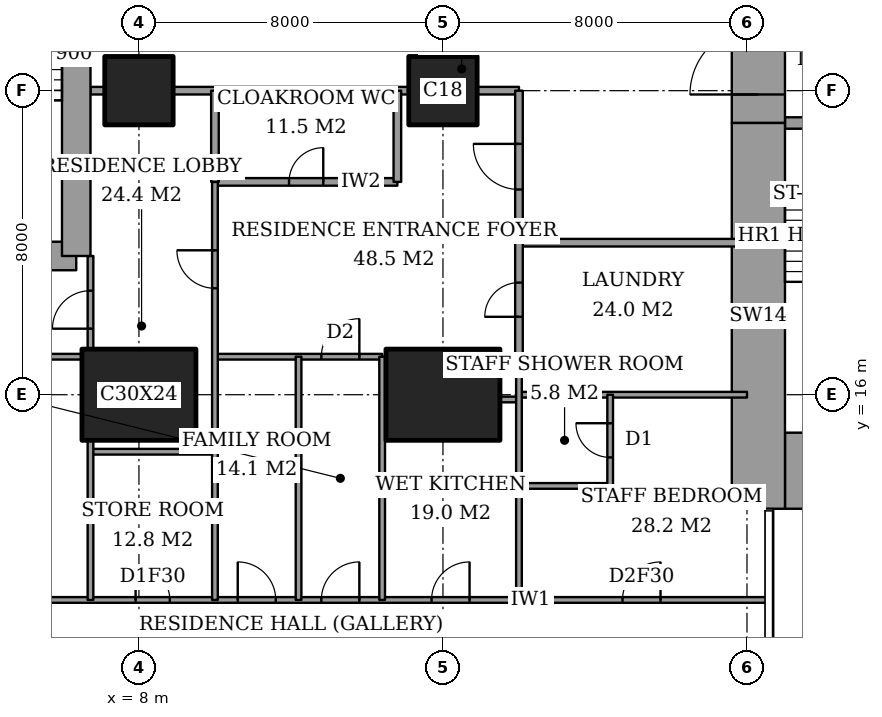
"""IFC4 building model, lengths in metres.
Left out: names, types, materials, properties, quantities, classifications, styles, units other than length and angle.
Written with IfcOpenShell. Run it as: python <this file> out.ifc"""

import sys

from ifc_helpers import new_model, si_unit, direction, frame, frame_2d, origin, origin_2d, place, context, subcontext, project, spatial, rectangle, extrude, element, fill, save


model = new_model("IFC4")
c1 = context("Model", 3, precision=1e-05, world=origin(), true_north=direction((0.0, 1.0)))
c2 = subcontext(c1, "Body", "Model", "MODEL_VIEW")
j1 = project(units=[si_unit("LENGTHUNIT", "METRE"), si_unit("PLANEANGLEUNIT", "RADIAN")], contexts=[c1])
p1 = place(None, origin())
s1 = spatial("IfcSite", under=j1, at=p1, CompositionType="ELEMENT")
p2 = place(p1, origin())
s2 = spatial("IfcBuilding", under=s1, at=p2, CompositionType="ELEMENT")
p3 = place(p2, frame((0.0, 0.0, 203.8)))
s3 = spatial("IfcBuildingStorey", under=s2, at=p3, CompositionType="ELEMENT", Elevation=203.8)
p4 = place(p3, frame((8.0, 16.0, 0.0), z_axis=(0.0, 0.0, 1.0), x_axis=(1.0, 0.0, 0.0)))
e1 = element("IfcColumn", 1, at=p4, inside=s3, PredefinedType="COLUMN", context=c2, shape_type="SweptSolid", body=[
    extrude(rectangle(XDim=3.0, YDim=2.4, at=origin_2d()), origin(), (0.0, 0.0, 1.0), 3.6),
])
p5 = place(p3, frame((8.0, 24.0, 0.0), z_axis=(0.0, 0.0, 1.0), x_axis=(1.0, 0.0, 0.0)))
e2 = element("IfcColumn", 2, at=p5, inside=s3, PredefinedType="COLUMN", context=c2, shape_type="SweptSolid", body=[
    extrude(rectangle(XDim=1.8, YDim=1.8, at=origin_2d()), origin(), (0.0, 0.0, 1.0), 3.6),
])
p6 = place(p3, frame((16.0, 16.0, 0.0), z_axis=(0.0, 0.0, 1.0), x_axis=(1.0, 0.0, 0.0)))
e3 = element("IfcColumn", 3, at=p6, inside=s3, PredefinedType="COLUMN", context=c2, shape_type="SweptSolid", body=[
    extrude(rectangle(XDim=3.0, YDim=2.4, at=origin_2d()), origin(), (0.0, 0.0, 1.0), 3.6),
])
p7 = place(p3, frame((16.0, 24.0, 0.0), z_axis=(0.0, 0.0, 1.0), x_axis=(1.0, 0.0, 0.0)))
e4 = element("IfcColumn", 4, at=p7, inside=s3, PredefinedType="COLUMN", context=c2, shape_type="SweptSolid", body=[
    extrude(rectangle(XDim=1.8, YDim=1.8, at=origin_2d()), origin(), (0.0, 0.0, 1.0), 3.6),
])
p8 = place(p3, frame((25.0, 14.0, 0.0), z_axis=(0.0, 0.0, 1.0), x_axis=(1.0, 0.0, 0.0)))
e5 = element("IfcWall", 5, at=p8, inside=s3, PredefinedType="SHEAR", context=c2, shape_type="SweptSolid", body=[
    extrude(rectangle(XDim=3.15, YDim=2.0, at=frame_2d((1.575, 0.0))), origin(), (0.0, 0.0, 1.0), 3.6),
])
p9 = place(p3, frame((24.3, 13.0, 0.0), z_axis=(0.0, 0.0, 1.0), x_axis=(0.0, 1.0, 0.0)))
e6 = element("IfcWall", 6, at=p9, inside=s3, PredefinedType="SHEAR", context=c2, shape_type="SweptSolid", body=[
    extrude(rectangle(XDim=10.15, YDim=1.4, at=frame_2d((5.075, 0.0))), origin(), (0.0, 0.0, 1.0), 3.6),
])
p10 = place(p3, frame((24.3, 23.15, 0.0), z_axis=(0.0, 0.0, 1.0), x_axis=(0.0, 1.0, 0.0)))
e7 = element("IfcWall", 7, at=p10, inside=s3, PredefinedType="SHEAR", context=c2, shape_type="SweptSolid", body=[
    extrude(rectangle(XDim=11.85, YDim=1.4, at=frame_2d((5.925, 0.0))), origin(), (0.0, 0.0, 1.0), 3.6),
])
p11 = place(p10, frame((0.75, 0.0, 0.0)))
e8 = element("IfcOpeningElement", 8, at=p11, cuts=e7, PredefinedType="OPENING", context=c2, shape_type="SweptSolid", body=[
    extrude(rectangle(XDim=1.8, YDim=2.4, at=frame_2d((0.9, 1.2))), frame((0.0, 0.71, 0.0), z_axis=(0.0, -1.0, 0.0), x_axis=(1.0, 0.0, 0.0)), (0.0, 0.0, 1.0), 1.42),
])
p12 = place(p3, frame((25.0, 23.15, 0.0), z_axis=(0.0, 0.0, 1.0), x_axis=(1.0, 0.0, 0.0)))
e9 = element("IfcWall", 9, at=p12, inside=s3, PredefinedType="SHEAR", context=c2, shape_type="SweptSolid", body=[
    extrude(rectangle(XDim=3.15, YDim=0.3, at=frame_2d((1.575, 0.0))), origin(), (0.0, 0.0, 1.0), 3.6),
])
p13 = place(p12, frame((0.6, 0.0, 0.0)))
e10 = element("IfcOpeningElement", 10, at=p13, cuts=e9, PredefinedType="OPENING", context=c2, shape_type="SweptSolid", body=[
    extrude(rectangle(XDim=1.0, YDim=2.1, at=frame_2d((0.5, 1.05))), frame((0.0, 0.16, 0.0), z_axis=(0.0, -1.0, 0.0), x_axis=(1.0, 0.0, 0.0)), (0.0, 0.0, 1.0), 0.32),
])
p14 = place(p3, frame((1.9, 19.65, 0.0), z_axis=(0.0, 0.0, 1.0), x_axis=(1.0, 0.0, 0.0)))
e11 = element("IfcWall", 11, at=p14, inside=s3, PredefinedType="SHEAR", context=c2, shape_type="SweptSolid", body=[
    extrude(rectangle(XDim=4.45, YDim=0.75, at=frame_2d((2.225, 0.0))), origin(), (0.0, 0.0, 1.0), 3.6),
])
p15 = place(p3, frame((6.35, 19.65, 0.0), z_axis=(0.0, 0.0, 1.0), x_axis=(0.0, 1.0, 0.0)))
e12 = element("IfcWall", 12, at=p15, inside=s3, PredefinedType="SHEAR", context=c2, shape_type="SweptSolid", body=[
    extrude(rectangle(XDim=8.7, YDim=0.75, at=frame_2d((4.35, 0.0))), origin(), (0.0, 0.0, 1.0), 3.6),
])
p16 = place(p15, frame((6.725, 0.0, 0.0)))
e13 = element("IfcOpeningElement", 13, at=p16, cuts=e12, PredefinedType="OPENING", context=c2, shape_type="SweptSolid", body=[
    extrude(rectangle(XDim=1.0, YDim=2.1, at=frame_2d((0.5, 1.05))), frame((0.0, 0.385, 0.0), z_axis=(0.0, -1.0, 0.0), x_axis=(1.0, 0.0, 0.0)), (0.0, 0.0, 1.0), 0.77),
])
p17 = place(p3, frame((-0.45, 10.6, 0.0), z_axis=(0.0, 0.0, 1.0), x_axis=(1.0, 0.0, 0.0)))
e14 = element("IfcWall", 14, at=p17, inside=s3, PredefinedType="PARTITIONING", context=c2, shape_type="SweptSolid", body=[
    extrude(rectangle(XDim=25.011, YDim=0.15, at=frame_2d((12.505, 0.0))), origin(), (0.0, 0.0, 1.0), 3.35),
])
p18 = place(p17, frame((13.25, 0.0, 0.0)))
e15 = element("IfcOpeningElement", 15, at=p18, cuts=e14, PredefinedType="OPENING", context=c2, shape_type="SweptSolid", body=[
    extrude(rectangle(XDim=1.0, YDim=2.1, at=frame_2d((0.5, 1.05))), frame((0.0, 0.085, 0.0), z_axis=(0.0, -1.0, 0.0), x_axis=(1.0, 0.0, 0.0)), (0.0, 0.0, 1.0), 0.17),
])
p19 = place(p17, frame((3.087, 0.0, 0.0)))
e16 = element("IfcOpeningElement", 16, at=p19, cuts=e14, PredefinedType="OPENING", context=c2, shape_type="SweptSolid", body=[
    extrude(rectangle(XDim=1.0, YDim=2.1, at=frame_2d((0.5, 1.05))), frame((0.0, 0.085, 0.0), z_axis=(0.0, -1.0, 0.0), x_axis=(1.0, 0.0, 0.0)), (0.0, 0.0, 1.0), 0.17),
])
p20 = place(p17, frame((8.363, 0.0, 0.0)))
e17 = element("IfcOpeningElement", 17, at=p20, cuts=e14, PredefinedType="OPENING", context=c2, shape_type="SweptSolid", body=[
    extrude(rectangle(XDim=0.9, YDim=2.1, at=frame_2d((0.45, 1.05))), frame((0.0, 0.085, 0.0), z_axis=(0.0, -1.0, 0.0), x_axis=(1.0, 0.0, 0.0)), (0.0, 0.0, 1.0), 0.17),
])
p21 = place(p17, frame((11.05, 0.0, 0.0)))
e18 = element("IfcOpeningElement", 18, at=p21, cuts=e14, PredefinedType="OPENING", context=c2, shape_type="SweptSolid", body=[
    extrude(rectangle(XDim=1.0, YDim=2.1, at=frame_2d((0.5, 1.05))), frame((0.0, 0.085, 0.0), z_axis=(0.0, -1.0, 0.0), x_axis=(1.0, 0.0, 0.0)), (0.0, 0.0, 1.0), 0.17),
])
p22 = place(p17, frame((16.15, 0.0, 0.0)))
e19 = element("IfcOpeningElement", 19, at=p22, cuts=e14, PredefinedType="OPENING", context=c2, shape_type="SweptSolid", body=[
    extrude(rectangle(XDim=1.0, YDim=2.1, at=frame_2d((0.5, 1.05))), frame((0.0, 0.085, 0.0), z_axis=(0.0, -1.0, 0.0), x_axis=(1.0, 0.0, 0.0)), (0.0, 0.0, 1.0), 0.17),
])
p23 = place(p17, frame((21.175, 0.0, 0.0)))
e20 = element("IfcOpeningElement", 20, at=p23, cuts=e14, PredefinedType="OPENING", context=c2, shape_type="SweptSolid", body=[
    extrude(rectangle(XDim=1.0, YDim=2.1, at=frame_2d((0.5, 1.05))), frame((0.0, 0.085, 0.0), z_axis=(0.0, -1.0, 0.0), x_axis=(1.0, 0.0, 0.0)), (0.0, 0.0, 1.0), 0.17),
])
p24 = place(p3, frame((18.0, 13.6, 0.0), z_axis=(0.0, 0.0, 1.0), x_axis=(1.0, 0.0, 0.0)))
e21 = element("IfcWall", 21, at=p24, inside=s3, PredefinedType="PARTITIONING", context=c2, shape_type="SweptSolid", body=[
    extrude(rectangle(XDim=2.4, YDim=0.15, at=frame_2d((1.2, 0.0))), origin(), (0.0, 0.0, 1.0), 3.35),
])
p25 = place(p3, frame((6.725, 14.5, 0.0), z_axis=(0.0, 0.0, 1.0), x_axis=(1.0, 0.0, 0.0)))
e22 = element("IfcWall", 22, at=p25, inside=s3, PredefinedType="PARTITIONING", context=c2, shape_type="SweptSolid", body=[
    extrude(rectangle(XDim=3.275, YDim=0.15, at=frame_2d((1.637, 0.0))), origin(), (0.0, 0.0, 1.0), 3.35),
])
p26 = place(p3, frame((17.5, 15.875, 0.0), z_axis=(0.0, 0.0, 1.0), x_axis=(1.0, 0.0, 0.0)))
e23 = element("IfcWall", 23, at=p26, inside=s3, PredefinedType="PARTITIONING", context=c2, shape_type="SweptSolid", body=[
    extrude(rectangle(XDim=0.5, YDim=0.15, at=frame_2d((0.25, 0.0))), origin(), (0.0, 0.0, 1.0), 2.634),
])
p27 = place(p3, frame((18.0, 16.0, 0.0), z_axis=(0.0, 0.0, 1.0), x_axis=(1.0, 0.0, 0.0)))
e24 = element("IfcWall", 24, at=p27, inside=s3, PredefinedType="PARTITIONING", context=c2, shape_type="SweptSolid", body=[
    extrude(rectangle(XDim=6.0, YDim=0.15, at=frame_2d((3.0, 0.0))), origin(), (0.0, 0.0, 1.0), 2.634),
])
p28 = place(p3, frame((-0.45, 17.0, 0.0), z_axis=(0.0, 0.0, 1.0), x_axis=(1.0, 0.0, 0.0)))
e25 = element("IfcWall", 25, at=p28, inside=s3, PredefinedType="PARTITIONING", context=c2, shape_type="SweptSolid", body=[
    extrude(rectangle(XDim=6.95, YDim=0.15, at=frame_2d((3.475, 0.0))), origin(), (0.0, 0.0, 1.0), 3.35),
])
p29 = place(p3, frame((10.0, 17.0, 0.0), z_axis=(0.0, 0.0, 1.0), x_axis=(1.0, 0.0, 0.0)))
e26 = element("IfcWall", 26, at=p29, inside=s3, PredefinedType="PARTITIONING", context=c2, shape_type="SweptSolid", body=[
    extrude(rectangle(XDim=4.4, YDim=0.15, at=frame_2d((2.2, 0.0))), origin(), (0.0, 0.0, 1.0), 3.35),
])
p30 = place(p29, frame((2.8, 0.0, 0.0)))
e27 = element("IfcOpeningElement", 27, at=p30, cuts=e26, PredefinedType="OPENING", context=c2, shape_type="SweptSolid", body=[
    extrude(rectangle(XDim=1.0, YDim=2.1, at=frame_2d((0.5, 1.05))), frame((0.0, 0.085, 0.0), z_axis=(0.0, -1.0, 0.0), x_axis=(1.0, 0.0, 0.0)), (0.0, 0.0, 1.0), 0.17),
])
p31 = place(p3, frame((18.0, 20.0, 0.0), z_axis=(0.0, 0.0, 1.0), x_axis=(1.0, 0.0, 0.0)))
e28 = element("IfcWall", 28, at=p31, inside=s3, PredefinedType="PARTITIONING", context=c2, shape_type="SweptSolid", body=[
    extrude(rectangle(XDim=6.0, YDim=0.2, at=frame_2d((3.0, 0.0))), origin(), (0.0, 0.0, 1.0), 3.35),
])
p32 = place(p3, frame((10.0, 21.6, 0.0), z_axis=(0.0, 0.0, 1.0), x_axis=(1.0, 0.0, 0.0)))
e29 = element("IfcWall", 29, at=p32, inside=s3, PredefinedType="PARTITIONING", context=c2, shape_type="SweptSolid", body=[
    extrude(rectangle(XDim=4.8, YDim=0.2, at=frame_2d((2.4, 0.0))), origin(), (0.0, 0.0, 1.0), 3.35),
])
p33 = place(p32, frame((1.95, 0.0, 0.0)))
e30 = element("IfcOpeningElement", 30, at=p33, cuts=e29, PredefinedType="OPENING", context=c2, shape_type="SweptSolid", body=[
    extrude(rectangle(XDim=0.9, YDim=2.1, at=frame_2d((0.45, 1.05))), frame((0.0, 0.11, 0.0), z_axis=(0.0, -1.0, 0.0), x_axis=(1.0, 0.0, 0.0)), (0.0, 0.0, 1.0), 0.22),
])
p34 = place(p3, frame((6.725, 24.0, 0.0), z_axis=(0.0, 0.0, 1.0), x_axis=(1.0, 0.0, 0.0)))
e31 = element("IfcWall", 31, at=p34, inside=s3, PredefinedType="PARTITIONING", context=c2, shape_type="SweptSolid", body=[
    extrude(rectangle(XDim=0.375, YDim=0.2, at=frame_2d((0.188, 0.0))), origin(), (0.0, 0.0, 1.0), 3.35),
])
p35 = place(p3, frame((8.9, 24.0, 0.0), z_axis=(0.0, 0.0, 1.0), x_axis=(1.0, 0.0, 0.0)))
e32 = element("IfcWall", 32, at=p35, inside=s3, PredefinedType="PARTITIONING", context=c2, shape_type="SweptSolid", body=[
    extrude(rectangle(XDim=6.2, YDim=0.2, at=frame_2d((3.1, 0.0))), origin(), (0.0, 0.0, 1.0), 3.35),
])
p36 = place(p3, frame((16.9, 24.0, 0.0), z_axis=(0.0, 0.0, 1.0), x_axis=(1.0, 0.0, 0.0)))
e33 = element("IfcWall", 33, at=p36, inside=s3, PredefinedType="PARTITIONING", context=c2, shape_type="SweptSolid", body=[
    extrude(rectangle(XDim=1.1, YDim=0.2, at=frame_2d((0.55, 0.0))), origin(), (0.0, 0.0, 1.0), 3.35),
])
p37 = place(p3, frame((6.725, 10.6, 0.0), z_axis=(0.0, 0.0, 1.0), x_axis=(0.0, 1.0, 0.0)))
e34 = element("IfcWall", 34, at=p37, inside=s3, PredefinedType="PARTITIONING", context=c2, shape_type="SweptSolid", body=[
    extrude(rectangle(XDim=4.2, YDim=0.15, at=frame_2d((2.1, 0.0))), origin(), (0.0, 0.0, 1.0), 3.35),
])
p38 = place(p3, frame((6.725, 17.2, 0.0), z_axis=(0.0, 0.0, 1.0), x_axis=(0.0, 1.0, 0.0)))
e35 = element("IfcWall", 35, at=p38, inside=s3, PredefinedType="PARTITIONING", context=c2, shape_type="SweptSolid", body=[
    extrude(rectangle(XDim=2.45, YDim=0.15, at=frame_2d((1.225, 0.0))), origin(), (0.0, 0.0, 1.0), 3.35),
])
p39 = place(p38, frame((0.538, 0.0, 0.0)))
e36 = element("IfcOpeningElement", 36, at=p39, cuts=e35, PredefinedType="OPENING", context=c2, shape_type="SweptSolid", body=[
    extrude(rectangle(XDim=1.0, YDim=2.1, at=frame_2d((0.5, 1.05))), frame((0.0, 0.085, 0.0), z_axis=(0.0, -1.0, 0.0), x_axis=(1.0, 0.0, 0.0)), (0.0, 0.0, 1.0), 0.17),
])
p40 = place(p3, frame((10.0, 21.6, 0.0), z_axis=(0.0, 0.0, 1.0), x_axis=(0.0, 1.0, 0.0)))
e37 = element("IfcWall", 37, at=p40, inside=s3, PredefinedType="PARTITIONING", context=c2, shape_type="SweptSolid", body=[
    extrude(rectangle(XDim=2.4, YDim=0.2, at=frame_2d((1.2, 0.0))), origin(), (0.0, 0.0, 1.0), 3.35),
])
p41 = place(p3, frame((10.0, 10.6, 0.0), z_axis=(0.0, 0.0, 1.0), x_axis=(0.0, 1.0, 0.0)))
e38 = element("IfcWall", 38, at=p41, inside=s3, PredefinedType="PARTITIONING", context=c2, shape_type="SweptSolid", body=[
    extrude(rectangle(XDim=11.0, YDim=0.15, at=frame_2d((5.5, 0.0))), origin(), (0.0, 0.0, 1.0), 3.35),
])
p42 = place(p41, frame((8.2, 0.0, 0.0)))
e39 = element("IfcOpeningElement", 39, at=p42, cuts=e38, PredefinedType="OPENING", context=c2, shape_type="SweptSolid", body=[
    extrude(rectangle(XDim=1.0, YDim=2.1, at=frame_2d((0.5, 1.05))), frame((0.0, 0.085, 0.0), z_axis=(0.0, -1.0, 0.0), x_axis=(1.0, 0.0, 0.0)), (0.0, 0.0, 1.0), 0.17),
])
for number, where, z_axis, x_axis in (
    (40, (12.2, 10.6, 0.0), (0.0, 0.0, 1.0), (0.0, 1.0, 0.0)),
    (41, (14.4, 10.6, 0.0), (0.0, 0.0, 1.0), (0.0, 1.0, 0.0)),
):
    element("IfcWall", number, at=place(p3, frame(where, z_axis=z_axis, x_axis=x_axis)), inside=s3, PredefinedType="PARTITIONING", context=c2, shape_type="SweptSolid", body=[
        extrude(rectangle(XDim=6.4, YDim=0.15, at=frame_2d((3.2, 0.0))), origin(), (0.0, 0.0, 1.0), 3.35),
    ])
p43 = place(p3, frame((14.8, 21.6, 0.0), z_axis=(0.0, 0.0, 1.0), x_axis=(0.0, 1.0, 0.0)))
e42 = element("IfcWall", 42, at=p43, inside=s3, PredefinedType="PARTITIONING", context=c2, shape_type="SweptSolid", body=[
    extrude(rectangle(XDim=2.4, YDim=0.2, at=frame_2d((1.2, 0.0))), origin(), (0.0, 0.0, 1.0), 3.35),
])
p44 = place(p3, frame((18.0, 17.0, 0.0), z_axis=(0.0, 0.0, 1.0), x_axis=(0.0, 1.0, 0.0)))
e43 = element("IfcWall", 43, at=p44, inside=s3, PredefinedType="PARTITIONING", context=c2, shape_type="SweptSolid", body=[
    extrude(rectangle(XDim=7.0, YDim=0.2, at=frame_2d((3.5, 0.0))), origin(), (0.0, 0.0, 1.0), 3.35),
])
p45 = place(p44, frame((4.4, 0.0, 0.0)))
e44 = element("IfcOpeningElement", 44, at=p45, cuts=e43, PredefinedType="OPENING", context=c2, shape_type="SweptSolid", body=[
    extrude(rectangle(XDim=1.2, YDim=2.4, at=frame_2d((0.6, 1.2))), frame((0.0, 0.11, 0.0), z_axis=(0.0, -1.0, 0.0), x_axis=(1.0, 0.0, 0.0)), (0.0, 0.0, 1.0), 0.22),
])
p46 = place(p44, frame((1.05, 0.0, 0.0)))
e45 = element("IfcOpeningElement", 45, at=p46, cuts=e43, PredefinedType="OPENING", context=c2, shape_type="SweptSolid", body=[
    extrude(rectangle(XDim=0.9, YDim=2.1, at=frame_2d((0.45, 1.05))), frame((0.0, 0.11, 0.0), z_axis=(0.0, -1.0, 0.0), x_axis=(1.0, 0.0, 0.0)), (0.0, 0.0, 1.0), 0.22),
])
p47 = place(p3, frame((18.0, 10.6, 0.0), z_axis=(0.0, 0.0, 1.0), x_axis=(0.0, 1.0, 0.0)))
e46 = element("IfcWall", 46, at=p47, inside=s3, PredefinedType="PARTITIONING", context=c2, shape_type="SweptSolid", body=[
    extrude(rectangle(XDim=6.4, YDim=0.15, at=frame_2d((3.2, 0.0))), origin(), (0.0, 0.0, 1.0), 3.35),
])
p48 = place(p3, frame((20.4, 13.6, 0.0), z_axis=(0.0, 0.0, 1.0), x_axis=(0.0, 1.0, 0.0)))
e47 = element("IfcWall", 47, at=p48, inside=s3, PredefinedType="PARTITIONING", context=c2, shape_type="SweptSolid", body=[
    extrude(rectangle(XDim=2.4, YDim=0.15, at=frame_2d((1.2, 0.0))), origin(), (0.0, 0.0, 1.0), 3.35),
])
p49 = place(p48, frame((0.75, 0.0, 0.0)))
e48 = element("IfcOpeningElement", 48, at=p49, cuts=e47, PredefinedType="OPENING", context=c2, shape_type="SweptSolid", body=[
    extrude(rectangle(XDim=0.9, YDim=2.1, at=frame_2d((0.45, 1.05))), frame((0.0, 0.085, 0.0), z_axis=(0.0, -1.0, 0.0), x_axis=(1.0, 0.0, 0.0)), (0.0, 0.0, 1.0), 0.17),
])
p50 = place(p18, origin())
e49 = element("IfcDoor", 49, at=p50, inside=s3, OperationType="SINGLE_SWING_LEFT", PredefinedType="DOOR", context=c2, shape_type="SweptSolid", body=[
    extrude(rectangle(XDim=1.0, YDim=2.1, at=frame_2d((0.5, 1.05))), frame((0.0, 0.025, 0.0), z_axis=(0.0, -1.0, 0.0), x_axis=(1.0, 0.0, 0.0)), (0.0, 0.0, 1.0), 0.05),
])
fill(e15, e49)
p51 = place(p39, origin())
e50 = element("IfcDoor", 50, at=p51, inside=s3, OperationType="SINGLE_SWING_RIGHT", PredefinedType="DOOR", context=c2, shape_type="SweptSolid", body=[
    extrude(rectangle(XDim=1.0, YDim=2.1, at=frame_2d((0.5, 1.05))), frame((0.0, 0.025, 0.0), z_axis=(0.0, -1.0, 0.0), x_axis=(1.0, 0.0, 0.0)), (0.0, 0.0, 1.0), 0.05),
])
fill(e36, e50)
p52 = place(p20, origin())
e51 = element("IfcDoor", 51, at=p52, inside=s3, OperationType="SINGLE_SWING_RIGHT", PredefinedType="DOOR", context=c2, shape_type="SweptSolid", body=[
    extrude(rectangle(XDim=0.9, YDim=2.1, at=frame_2d((0.45, 1.05))), frame((0.0, 0.025, 0.0), z_axis=(0.0, -1.0, 0.0), x_axis=(1.0, 0.0, 0.0)), (0.0, 0.0, 1.0), 0.05),
])
fill(e17, e51)
p53 = place(p42, origin())
e52 = element("IfcDoor", 52, at=p53, inside=s3, OperationType="SINGLE_SWING_LEFT", PredefinedType="DOOR", context=c2, shape_type="SweptSolid", body=[
    extrude(rectangle(XDim=1.0, YDim=2.1, at=frame_2d((0.5, 1.05))), frame((0.0, 0.025, 0.0), z_axis=(0.0, -1.0, 0.0), x_axis=(1.0, 0.0, 0.0)), (0.0, 0.0, 1.0), 0.05),
])
fill(e39, e52)
p54 = place(p33, origin())
e53 = element("IfcDoor", 53, at=p54, inside=s3, OperationType="SINGLE_SWING_LEFT", PredefinedType="DOOR", context=c2, shape_type="SweptSolid", body=[
    extrude(rectangle(XDim=0.9, YDim=2.1, at=frame_2d((0.45, 1.05))), frame((0.0, 0.025, 0.0), z_axis=(0.0, -1.0, 0.0), x_axis=(1.0, 0.0, 0.0)), (0.0, 0.0, 1.0), 0.05),
])
fill(e30, e53)
p55 = place(p45, origin())
e54 = element("IfcDoor", 54, at=p55, inside=s3, OperationType="SINGLE_SWING_LEFT", PredefinedType="DOOR", context=c2, shape_type="SweptSolid", body=[
    extrude(rectangle(XDim=1.2, YDim=2.4, at=frame_2d((0.6, 1.2))), frame((0.0, 0.025, 0.0), z_axis=(0.0, -1.0, 0.0), x_axis=(1.0, 0.0, 0.0)), (0.0, 0.0, 1.0), 0.05),
])
fill(e44, e54)
p56 = place(p21, origin())
e55 = element("IfcDoor", 55, at=p56, inside=s3, OperationType="SINGLE_SWING_RIGHT", PredefinedType="DOOR", context=c2, shape_type="SweptSolid", body=[
    extrude(rectangle(XDim=1.0, YDim=2.1, at=frame_2d((0.5, 1.05))), frame((0.0, 0.025, 0.0), z_axis=(0.0, -1.0, 0.0), x_axis=(1.0, 0.0, 0.0)), (0.0, 0.0, 1.0), 0.05),
])
fill(e18, e55)
p57 = place(p30, origin())
e56 = element("IfcDoor", 56, at=p57, inside=s3, OperationType="SINGLE_SWING_LEFT", PredefinedType="DOOR", context=c2, shape_type="SweptSolid", body=[
    extrude(rectangle(XDim=1.0, YDim=2.1, at=frame_2d((0.5, 1.05))), frame((0.0, 0.025, 0.0), z_axis=(0.0, -1.0, 0.0), x_axis=(1.0, 0.0, 0.0)), (0.0, 0.0, 1.0), 0.05),
])
fill(e27, e56)
p58 = place(p22, origin())
e57 = element("IfcDoor", 57, at=p58, inside=s3, OperationType="SINGLE_SWING_LEFT", PredefinedType="DOOR", context=c2, shape_type="SweptSolid", body=[
    extrude(rectangle(XDim=1.0, YDim=2.1, at=frame_2d((0.5, 1.05))), frame((0.0, 0.025, 0.0), z_axis=(0.0, -1.0, 0.0), x_axis=(1.0, 0.0, 0.0)), (0.0, 0.0, 1.0), 0.05),
])
fill(e19, e57)
p59 = place(p49, origin())
e58 = element("IfcDoor", 58, at=p59, inside=s3, OperationType="SINGLE_SWING_LEFT", PredefinedType="DOOR", context=c2, shape_type="SweptSolid", body=[
    extrude(rectangle(XDim=0.9, YDim=2.1, at=frame_2d((0.45, 1.05))), frame((0.0, 0.025, 0.0), z_axis=(0.0, -1.0, 0.0), x_axis=(1.0, 0.0, 0.0)), (0.0, 0.0, 1.0), 0.05),
])
fill(e48, e58)
p60 = place(p23, origin())
e59 = element("IfcDoor", 59, at=p60, inside=s3, OperationType="SINGLE_SWING_LEFT", PredefinedType="DOOR", context=c2, shape_type="SweptSolid", body=[
    extrude(rectangle(XDim=1.0, YDim=2.1, at=frame_2d((0.5, 1.05))), frame((0.0, 0.025, 0.0), z_axis=(0.0, -1.0, 0.0), x_axis=(1.0, 0.0, 0.0)), (0.0, 0.0, 1.0), 0.05),
])
fill(e20, e59)
p61 = place(p46, origin())
e60 = element("IfcDoor", 60, at=p61, inside=s3, OperationType="SINGLE_SWING_RIGHT", PredefinedType="DOOR", context=c2, shape_type="SweptSolid", body=[
    extrude(rectangle(XDim=0.9, YDim=2.1, at=frame_2d((0.45, 1.05))), frame((0.0, 0.025, 0.0), z_axis=(0.0, -1.0, 0.0), x_axis=(1.0, 0.0, 0.0)), (0.0, 0.0, 1.0), 0.05),
])
fill(e45, e60)
p62 = place(p11, origin())
e61 = element("IfcDoor", 61, at=p62, inside=s3, OperationType="DOUBLE_DOOR_DOUBLE_SWING", PredefinedType="DOOR", context=c2, shape_type="SweptSolid", body=[
    extrude(rectangle(XDim=1.8, YDim=2.4, at=frame_2d((0.9, 1.2))), frame((0.0, 0.025, 0.0), z_axis=(0.0, -1.0, 0.0), x_axis=(1.0, 0.0, 0.0)), (0.0, 0.0, 1.0), 0.05),
])
fill(e8, e61)
save(model, sys.argv[1])
